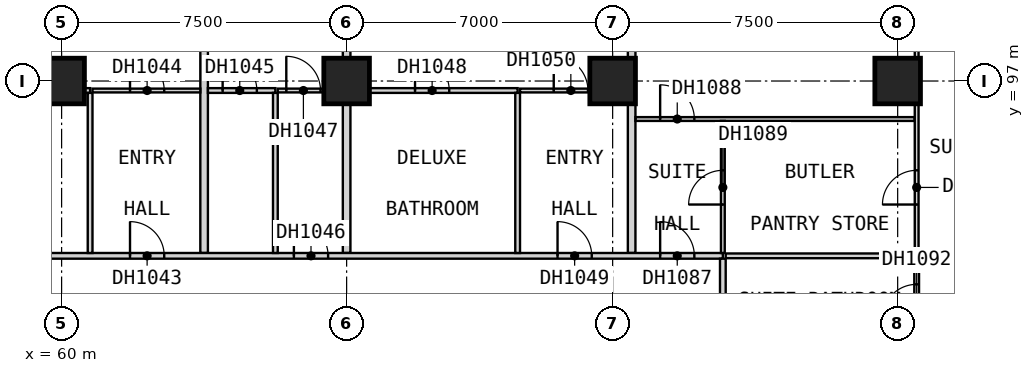
"""IFC4 building model, lengths in metres.
Left out: names, types, materials, properties, quantities, classifications, styles, units other than length and angle.
Written with IfcOpenShell. Run it as: python <this file> out.ifc"""

import sys

from ifc_helpers import new_model, si_unit, direction, frame, frame_2d, origin, origin_2d, place, context, subcontext, project, spatial, rectangle, extrude, element, fill, save


model = new_model("IFC4")
c1 = context("Model", 3, precision=1e-05, world=origin(), true_north=direction((0.0, 1.0)))
c2 = subcontext(c1, "Body", "Model", "MODEL_VIEW")
j1 = project(units=[si_unit("LENGTHUNIT", "METRE"), si_unit("PLANEANGLEUNIT", "RADIAN")], contexts=[c1])
p1 = place(None, origin())
s1 = spatial("IfcSite", under=j1, at=p1, CompositionType="ELEMENT")
p2 = place(p1, origin())
s2 = spatial("IfcBuilding", under=s1, at=p2, CompositionType="ELEMENT")
p3 = place(p2, frame((0.0, 0.0, 34.0)))
s3 = spatial("IfcBuildingStorey", under=s2, at=p3, CompositionType="ELEMENT", Elevation=34.0)
for number, where, z_axis, x_axis in (
    (1, (60.0, 97.0, 0.0), (0.0, 0.0, 1.0), (1.0, 0.0, 0.0)),
    (2, (67.5, 97.0, 0.0), (0.0, 0.0, 1.0), (1.0, 0.0, 0.0)),
    (3, (74.5, 97.0, 0.0), (0.0, 0.0, 1.0), (1.0, 0.0, 0.0)),
    (4, (82.0, 97.0, 0.0), (0.0, 0.0, 1.0), (1.0, 0.0, 0.0)),
):
    element("IfcColumn", number, at=place(p3, frame(where, z_axis=z_axis, x_axis=x_axis)), inside=s3, PredefinedType="COLUMN", context=c2, shape_type="SweptSolid", body=[
        extrude(rectangle(XDim=1.2, YDim=1.2, at=origin_2d()), origin(), (0.0, 0.0, 1.0), 3.6),
    ])
p4 = place(p3, frame((63.75, 92.475, 0.0), z_axis=(0.0, 0.0, 1.0), x_axis=(0.0, 1.0, 0.0)))
e5 = element("IfcWall", 5, at=p4, inside=s3, PredefinedType="PARTITIONING", context=c2, shape_type="SweptSolid", body=[
    extrude(rectangle(XDim=11.715, YDim=0.2, at=frame_2d((5.857, 0.0))), origin(), (0.0, 0.0, 1.0), 3.35),
])
p5 = place(p3, frame((67.5, 92.475, 0.0), z_axis=(0.0, 0.0, 1.0), x_axis=(0.0, 1.0, 0.0)))
e6 = element("IfcWall", 6, at=p5, inside=s3, PredefinedType="PARTITIONING", context=c2, shape_type="SweptSolid", body=[
    extrude(rectangle(XDim=12.525, YDim=0.2, at=frame_2d((6.262, 0.0))), origin(), (0.0, 0.0, 1.0), 3.35),
])
p6 = place(p3, frame((75.0, 92.475, 0.0), z_axis=(0.0, 0.0, 1.0), x_axis=(0.0, 1.0, 0.0)))
e7 = element("IfcWall", 7, at=p6, inside=s3, PredefinedType="PARTITIONING", context=c2, shape_type="SweptSolid", body=[
    extrude(rectangle(XDim=11.715, YDim=0.2, at=frame_2d((5.857, 0.0))), origin(), (0.0, 0.0, 1.0), 3.35),
])
p7 = place(p3, frame((33.75, 92.4, 0.0), z_axis=(0.0, 0.0, 1.0), x_axis=(1.0, 0.0, 0.0)))
e8 = element("IfcWall", 8, at=p7, inside=s3, PredefinedType="PARTITIONING", context=c2, shape_type="SweptSolid", body=[
    extrude(rectangle(XDim=43.65, YDim=0.15, at=frame_2d((21.825, 0.0))), origin(), (0.0, 0.0, 1.0), 3.35),
])
p8 = place(p7, frame((5.175, 0.0, 0.0)))
e9 = element("IfcOpeningElement", 9, at=p8, cuts=e8, PredefinedType="OPENING", context=c2, shape_type="SweptSolid", body=[
    extrude(rectangle(XDim=0.9, YDim=2.1, at=frame_2d((0.45, 1.05))), frame((0.0, 0.085, 0.0), z_axis=(0.0, -1.0, 0.0), x_axis=(1.0, 0.0, 0.0)), (0.0, 0.0, 1.0), 0.17),
])
p9 = place(p7, frame((9.863, 0.0, 0.0)))
e10 = element("IfcOpeningElement", 10, at=p9, cuts=e8, PredefinedType="OPENING", context=c2, shape_type="SweptSolid", body=[
    extrude(rectangle(XDim=0.9, YDim=2.1, at=frame_2d((0.45, 1.05))), frame((0.0, 0.085, 0.0), z_axis=(0.0, -1.0, 0.0), x_axis=(1.0, 0.0, 0.0)), (0.0, 0.0, 1.0), 0.17),
])
p10 = place(p7, frame((13.613, 0.0, 0.0)))
e11 = element("IfcOpeningElement", 11, at=p10, cuts=e8, PredefinedType="OPENING", context=c2, shape_type="SweptSolid", body=[
    extrude(rectangle(XDim=0.9, YDim=2.1, at=frame_2d((0.45, 1.05))), frame((0.0, 0.085, 0.0), z_axis=(0.0, -1.0, 0.0), x_axis=(1.0, 0.0, 0.0)), (0.0, 0.0, 1.0), 0.17),
])
p11 = place(p7, frame((17.363, 0.0, 0.0)))
e12 = element("IfcOpeningElement", 12, at=p11, cuts=e8, PredefinedType="OPENING", context=c2, shape_type="SweptSolid", body=[
    extrude(rectangle(XDim=0.9, YDim=2.1, at=frame_2d((0.45, 1.05))), frame((0.0, 0.085, 0.0), z_axis=(0.0, -1.0, 0.0), x_axis=(1.0, 0.0, 0.0)), (0.0, 0.0, 1.0), 0.17),
])
p12 = place(p7, frame((21.113, 0.0, 0.0)))
e13 = element("IfcOpeningElement", 13, at=p12, cuts=e8, PredefinedType="OPENING", context=c2, shape_type="SweptSolid", body=[
    extrude(rectangle(XDim=0.9, YDim=2.1, at=frame_2d((0.45, 1.05))), frame((0.0, 0.085, 0.0), z_axis=(0.0, -1.0, 0.0), x_axis=(1.0, 0.0, 0.0)), (0.0, 0.0, 1.0), 0.17),
])
p13 = place(p7, frame((28.05, 0.0, 0.0)))
e14 = element("IfcOpeningElement", 14, at=p13, cuts=e8, PredefinedType="OPENING", context=c2, shape_type="SweptSolid", body=[
    extrude(rectangle(XDim=0.9, YDim=2.1, at=frame_2d((0.45, 1.05))), frame((0.0, 0.085, 0.0), z_axis=(0.0, -1.0, 0.0), x_axis=(1.0, 0.0, 0.0)), (0.0, 0.0, 1.0), 0.17),
])
p14 = place(p7, frame((32.363, 0.0, 0.0)))
e15 = element("IfcOpeningElement", 15, at=p14, cuts=e8, PredefinedType="OPENING", context=c2, shape_type="SweptSolid", body=[
    extrude(rectangle(XDim=0.9, YDim=2.1, at=frame_2d((0.45, 1.05))), frame((0.0, 0.085, 0.0), z_axis=(0.0, -1.0, 0.0), x_axis=(1.0, 0.0, 0.0)), (0.0, 0.0, 1.0), 0.17),
])
p15 = place(p7, frame((39.3, 0.0, 0.0)))
e16 = element("IfcOpeningElement", 16, at=p15, cuts=e8, PredefinedType="OPENING", context=c2, shape_type="SweptSolid", body=[
    extrude(rectangle(XDim=0.9, YDim=2.1, at=frame_2d((0.45, 1.05))), frame((0.0, 0.085, 0.0), z_axis=(0.0, -1.0, 0.0), x_axis=(1.0, 0.0, 0.0)), (0.0, 0.0, 1.0), 0.17),
])
p16 = place(p7, frame((42.0, 0.0, 0.0)))
e17 = element("IfcOpeningElement", 17, at=p16, cuts=e8, PredefinedType="OPENING", context=c2, shape_type="SweptSolid", body=[
    extrude(rectangle(XDim=0.9, YDim=2.1, at=frame_2d((0.45, 1.05))), frame((0.0, 0.085, 0.0), z_axis=(0.0, -1.0, 0.0), x_axis=(1.0, 0.0, 0.0)), (0.0, 0.0, 1.0), 0.17),
])
p17 = place(p3, frame((77.4, 50.175, 0.0), z_axis=(0.0, 0.0, 1.0), x_axis=(0.0, 1.0, 0.0)))
e18 = element("IfcWall", 18, at=p17, inside=s3, PredefinedType="PARTITIONING", context=c2, shape_type="SweptSolid", body=[
    extrude(rectangle(XDim=42.15, YDim=0.15, at=frame_2d((21.075, 0.0))), origin(), (0.0, 0.0, 1.0), 3.35),
])
p18 = place(p17, frame((4.688, 0.0, 0.0)))
e19 = element("IfcOpeningElement", 19, at=p18, cuts=e18, PredefinedType="OPENING", context=c2, shape_type="SweptSolid", body=[
    extrude(rectangle(XDim=0.9, YDim=2.1, at=frame_2d((0.45, 1.05))), frame((0.0, 0.085, 0.0), z_axis=(0.0, -1.0, 0.0), x_axis=(1.0, 0.0, 0.0)), (0.0, 0.0, 1.0), 0.17),
])
p19 = place(p17, frame((8.438, 0.0, 0.0)))
e20 = element("IfcOpeningElement", 20, at=p19, cuts=e18, PredefinedType="OPENING", context=c2, shape_type="SweptSolid", body=[
    extrude(rectangle(XDim=0.9, YDim=2.1, at=frame_2d((0.45, 1.05))), frame((0.0, 0.085, 0.0), z_axis=(0.0, -1.0, 0.0), x_axis=(1.0, 0.0, 0.0)), (0.0, 0.0, 1.0), 0.17),
])
p20 = place(p17, frame((12.188, 0.0, 0.0)))
e21 = element("IfcOpeningElement", 21, at=p20, cuts=e18, PredefinedType="OPENING", context=c2, shape_type="SweptSolid", body=[
    extrude(rectangle(XDim=0.9, YDim=2.1, at=frame_2d((0.45, 1.05))), frame((0.0, 0.085, 0.0), z_axis=(0.0, -1.0, 0.0), x_axis=(1.0, 0.0, 0.0)), (0.0, 0.0, 1.0), 0.17),
])
p21 = place(p17, frame((15.938, 0.0, 0.0)))
e22 = element("IfcOpeningElement", 22, at=p21, cuts=e18, PredefinedType="OPENING", context=c2, shape_type="SweptSolid", body=[
    extrude(rectangle(XDim=0.9, YDim=2.1, at=frame_2d((0.45, 1.05))), frame((0.0, 0.085, 0.0), z_axis=(0.0, -1.0, 0.0), x_axis=(1.0, 0.0, 0.0)), (0.0, 0.0, 1.0), 0.17),
])
p22 = place(p17, frame((19.688, 0.0, 0.0)))
e23 = element("IfcOpeningElement", 23, at=p22, cuts=e18, PredefinedType="OPENING", context=c2, shape_type="SweptSolid", body=[
    extrude(rectangle(XDim=0.9, YDim=2.1, at=frame_2d((0.45, 1.05))), frame((0.0, 0.085, 0.0), z_axis=(0.0, -1.0, 0.0), x_axis=(1.0, 0.0, 0.0)), (0.0, 0.0, 1.0), 0.17),
])
p23 = place(p17, frame((23.438, 0.0, 0.0)))
e24 = element("IfcOpeningElement", 24, at=p23, cuts=e18, PredefinedType="OPENING", context=c2, shape_type="SweptSolid", body=[
    extrude(rectangle(XDim=0.9, YDim=2.1, at=frame_2d((0.45, 1.05))), frame((0.0, 0.085, 0.0), z_axis=(0.0, -1.0, 0.0), x_axis=(1.0, 0.0, 0.0)), (0.0, 0.0, 1.0), 0.17),
])
p24 = place(p17, frame((27.188, 0.0, 0.0)))
e25 = element("IfcOpeningElement", 25, at=p24, cuts=e18, PredefinedType="OPENING", context=c2, shape_type="SweptSolid", body=[
    extrude(rectangle(XDim=0.9, YDim=2.1, at=frame_2d((0.45, 1.05))), frame((0.0, 0.085, 0.0), z_axis=(0.0, -1.0, 0.0), x_axis=(1.0, 0.0, 0.0)), (0.0, 0.0, 1.0), 0.17),
])
p25 = place(p17, frame((30.938, 0.0, 0.0)))
e26 = element("IfcOpeningElement", 26, at=p25, cuts=e18, PredefinedType="OPENING", context=c2, shape_type="SweptSolid", body=[
    extrude(rectangle(XDim=0.9, YDim=2.1, at=frame_2d((0.45, 1.05))), frame((0.0, 0.085, 0.0), z_axis=(0.0, -1.0, 0.0), x_axis=(1.0, 0.0, 0.0)), (0.0, 0.0, 1.0), 0.17),
])
p26 = place(p17, frame((34.688, 0.0, 0.0)))
e27 = element("IfcOpeningElement", 27, at=p26, cuts=e18, PredefinedType="OPENING", context=c2, shape_type="SweptSolid", body=[
    extrude(rectangle(XDim=0.9, YDim=2.1, at=frame_2d((0.45, 1.05))), frame((0.0, 0.085, 0.0), z_axis=(0.0, -1.0, 0.0), x_axis=(1.0, 0.0, 0.0)), (0.0, 0.0, 1.0), 0.17),
])
p27 = place(p17, frame((38.438, 0.0, 0.0)))
e28 = element("IfcOpeningElement", 28, at=p27, cuts=e18, PredefinedType="OPENING", context=c2, shape_type="SweptSolid", body=[
    extrude(rectangle(XDim=0.9, YDim=2.1, at=frame_2d((0.45, 1.05))), frame((0.0, 0.085, 0.0), z_axis=(0.0, -1.0, 0.0), x_axis=(1.0, 0.0, 0.0)), (0.0, 0.0, 1.0), 0.17),
])
p28 = place(p3, frame((75.1, 96.0, 0.0), z_axis=(0.0, 0.0, 1.0), x_axis=(1.0, 0.0, 0.0)))
e29 = element("IfcWall", 29, at=p28, inside=s3, PredefinedType="PARTITIONING", context=c2, shape_type="SweptSolid", body=[
    extrude(rectangle(XDim=7.35, YDim=0.1, at=frame_2d((3.675, 0.0))), origin(), (0.0, 0.0, 1.0), 3.35),
])
p29 = place(p28, frame((0.65, 0.0, 0.0)))
e30 = element("IfcOpeningElement", 30, at=p29, cuts=e29, PredefinedType="OPENING", context=c2, shape_type="SweptSolid", body=[
    extrude(rectangle(XDim=0.9, YDim=2.1, at=frame_2d((0.45, 1.05))), frame((0.0, 0.06, 0.0), z_axis=(0.0, -1.0, 0.0), x_axis=(1.0, 0.0, 0.0)), (0.0, 0.0, 1.0), 0.12),
])
p30 = place(p3, frame((60.812, 96.75, 0.0), z_axis=(0.0, 0.0, 1.0), x_axis=(1.0, 0.0, 0.0)))
e31 = element("IfcWall", 31, at=p30, inside=s3, PredefinedType="PARTITIONING", context=c2, shape_type="SweptSolid", body=[
    extrude(rectangle(XDim=2.837, YDim=0.1, at=frame_2d((1.419, 0.0))), origin(), (0.0, 0.0, 1.0), 3.35),
])
p31 = place(p30, frame((0.988, 0.0, 0.0)))
e32 = element("IfcOpeningElement", 32, at=p31, cuts=e31, PredefinedType="OPENING", context=c2, shape_type="SweptSolid", body=[
    extrude(rectangle(XDim=0.9, YDim=2.1, at=frame_2d((0.45, 1.05))), frame((0.0, 0.06, 0.0), z_axis=(0.0, -1.0, 0.0), x_axis=(1.0, 0.0, 0.0)), (0.0, 0.0, 1.0), 0.12),
])
p32 = place(p3, frame((65.688, 96.75, 0.0), z_axis=(0.0, 0.0, 1.0), x_axis=(1.0, 0.0, 0.0)))
e33 = element("IfcWall", 33, at=p32, inside=s3, PredefinedType="PARTITIONING", context=c2, shape_type="SweptSolid", body=[
    extrude(rectangle(XDim=1.712, YDim=0.1, at=frame_2d((0.856, 0.0))), origin(), (0.0, 0.0, 1.0), 3.35),
])
p33 = place(p32, frame((0.225, 0.0, 0.0)))
e34 = element("IfcOpeningElement", 34, at=p33, cuts=e33, PredefinedType="OPENING", context=c2, shape_type="SweptSolid", body=[
    extrude(rectangle(XDim=0.9, YDim=2.1, at=frame_2d((0.45, 1.05))), frame((0.0, 0.06, 0.0), z_axis=(0.0, -1.0, 0.0), x_axis=(1.0, 0.0, 0.0)), (0.0, 0.0, 1.0), 0.12),
])
p34 = place(p3, frame((72.062, 96.75, 0.0), z_axis=(0.0, 0.0, 1.0), x_axis=(1.0, 0.0, 0.0)))
e35 = element("IfcWall", 35, at=p34, inside=s3, PredefinedType="PARTITIONING", context=c2, shape_type="SweptSolid", body=[
    extrude(rectangle(XDim=2.837, YDim=0.1, at=frame_2d((1.419, 0.0))), origin(), (0.0, 0.0, 1.0), 3.35),
])
p35 = place(p34, frame((0.887, 0.0, 0.0)))
e36 = element("IfcOpeningElement", 36, at=p35, cuts=e35, PredefinedType="OPENING", context=c2, shape_type="SweptSolid", body=[
    extrude(rectangle(XDim=0.9, YDim=2.1, at=frame_2d((0.45, 1.05))), frame((0.0, 0.06, 0.0), z_axis=(0.0, -1.0, 0.0), x_axis=(1.0, 0.0, 0.0)), (0.0, 0.0, 1.0), 0.12),
])
p36 = place(p3, frame((77.4, 92.475, 0.0), z_axis=(0.0, 0.0, 1.0), x_axis=(0.0, 1.0, 0.0)))
e37 = element("IfcWall", 37, at=p36, inside=s3, PredefinedType="PARTITIONING", context=c2, shape_type="SweptSolid", body=[
    extrude(rectangle(XDim=3.475, YDim=0.1, at=frame_2d((1.737, 0.0))), origin(), (0.0, 0.0, 1.0), 3.35),
])
p37 = place(p36, frame((1.275, 0.0, 0.0)))
e38 = element("IfcOpeningElement", 38, at=p37, cuts=e37, PredefinedType="OPENING", context=c2, shape_type="SweptSolid", body=[
    extrude(rectangle(XDim=0.9, YDim=2.1, at=frame_2d((0.45, 1.05))), frame((0.0, 0.06, 0.0), z_axis=(0.0, -1.0, 0.0), x_axis=(1.0, 0.0, 0.0)), (0.0, 0.0, 1.0), 0.12),
])
p38 = place(p3, frame((82.5, 92.462, 0.0), z_axis=(0.0, 0.0, 1.0), x_axis=(0.0, 1.0, 0.0)))
e39 = element("IfcWall", 39, at=p38, inside=s3, PredefinedType="PARTITIONING", context=c2, shape_type="SweptSolid", body=[
    extrude(rectangle(XDim=11.728, YDim=0.1, at=frame_2d((5.864, 0.0))), origin(), (0.0, 0.0, 1.0), 3.35),
])
p39 = place(p38, frame((9.837, 0.0, 0.0)))
e40 = element("IfcOpeningElement", 40, at=p39, cuts=e39, PredefinedType="OPENING", context=c2, shape_type="SweptSolid", body=[
    extrude(rectangle(XDim=0.9, YDim=2.1, at=frame_2d((0.45, 1.05))), frame((0.0, 0.06, 0.0), z_axis=(0.0, -1.0, 0.0), x_axis=(1.0, 0.0, 0.0)), (0.0, 0.0, 1.0), 0.12),
])
p40 = place(p38, frame((1.288, 0.0, 0.0)))
e41 = element("IfcOpeningElement", 41, at=p40, cuts=e39, PredefinedType="OPENING", context=c2, shape_type="SweptSolid", body=[
    extrude(rectangle(XDim=0.9, YDim=2.1, at=frame_2d((0.45, 1.05))), frame((0.0, 0.06, 0.0), z_axis=(0.0, -1.0, 0.0), x_axis=(1.0, 0.0, 0.0)), (0.0, 0.0, 1.0), 0.12),
])
p41 = place(p3, frame((77.475, 92.4, 0.0), z_axis=(0.0, 0.0, 1.0), x_axis=(1.0, 0.0, 0.0)))
e42 = element("IfcWall", 42, at=p41, inside=s3, PredefinedType="PARTITIONING", context=c2, shape_type="SweptSolid", body=[
    extrude(rectangle(XDim=5.025, YDim=0.125, at=frame_2d((2.512, 0.0))), origin(), (0.0, 0.0, 1.0), 3.35),
])
p42 = place(p3, frame((56.35, 96.75, 0.0), z_axis=(0.0, 0.0, 1.0), x_axis=(1.0, 0.0, 0.0)))
e43 = element("IfcWall", 43, at=p42, inside=s3, PredefinedType="PARTITIONING", context=c2, shape_type="SweptSolid", body=[
    extrude(rectangle(XDim=4.4, YDim=0.125, at=frame_2d((2.2, 0.0))), origin(), (0.0, 0.0, 1.0), 3.35),
])
p43 = place(p42, frame((1.7, 0.0, 0.0)))
e44 = element("IfcOpeningElement", 44, at=p43, cuts=e43, PredefinedType="OPENING", context=c2, shape_type="SweptSolid", body=[
    extrude(rectangle(XDim=0.9, YDim=2.1, at=frame_2d((0.45, 1.05))), frame((0.0, 0.073, 0.0), z_axis=(0.0, -1.0, 0.0), x_axis=(1.0, 0.0, 0.0)), (0.0, 0.0, 1.0), 0.145),
])
p44 = place(p3, frame((63.85, 96.75, 0.0), z_axis=(0.0, 0.0, 1.0), x_axis=(1.0, 0.0, 0.0)))
e45 = element("IfcWall", 45, at=p44, inside=s3, PredefinedType="PARTITIONING", context=c2, shape_type="SweptSolid", body=[
    extrude(rectangle(XDim=1.775, YDim=0.125, at=frame_2d((0.887, 0.0))), origin(), (0.0, 0.0, 1.0), 3.35),
])
p45 = place(p44, frame((0.387, 0.0, 0.0)))
e46 = element("IfcOpeningElement", 46, at=p45, cuts=e45, PredefinedType="OPENING", context=c2, shape_type="SweptSolid", body=[
    extrude(rectangle(XDim=0.9, YDim=2.1, at=frame_2d((0.45, 1.05))), frame((0.0, 0.073, 0.0), z_axis=(0.0, -1.0, 0.0), x_axis=(1.0, 0.0, 0.0)), (0.0, 0.0, 1.0), 0.145),
])
p46 = place(p3, frame((67.6, 96.75, 0.0), z_axis=(0.0, 0.0, 1.0), x_axis=(1.0, 0.0, 0.0)))
e47 = element("IfcWall", 47, at=p46, inside=s3, PredefinedType="PARTITIONING", context=c2, shape_type="SweptSolid", body=[
    extrude(rectangle(XDim=4.4, YDim=0.125, at=frame_2d((2.2, 0.0))), origin(), (0.0, 0.0, 1.0), 3.35),
])
p47 = place(p46, frame((1.7, 0.0, 0.0)))
e48 = element("IfcOpeningElement", 48, at=p47, cuts=e47, PredefinedType="OPENING", context=c2, shape_type="SweptSolid", body=[
    extrude(rectangle(XDim=0.9, YDim=2.1, at=frame_2d((0.45, 1.05))), frame((0.0, 0.073, 0.0), z_axis=(0.0, -1.0, 0.0), x_axis=(1.0, 0.0, 0.0)), (0.0, 0.0, 1.0), 0.145),
])
for number, where, z_axis, x_axis in (
    (49, (60.75, 92.475, 0.0), (0.0, 0.0, 1.0), (0.0, 1.0, 0.0)),
    (50, (65.625, 92.475, 0.0), (0.0, 0.0, 1.0), (0.0, 1.0, 0.0)),
    (51, (72.0, 92.475, 0.0), (0.0, 0.0, 1.0), (0.0, 1.0, 0.0)),
):
    element("IfcWall", number, at=place(p3, frame(where, z_axis=z_axis, x_axis=x_axis)), inside=s3, PredefinedType="PARTITIONING", context=c2, shape_type="SweptSolid", body=[
        extrude(rectangle(XDim=4.212, YDim=0.125, at=frame_2d((2.106, 0.0))), origin(), (0.0, 0.0, 1.0), 3.35),
    ])
p48 = place(p3, frame((82.5, 90.1, 0.0), z_axis=(0.0, 0.0, 1.0), x_axis=(0.0, 1.0, 0.0)))
e52 = element("IfcWall", 52, at=p48, inside=s3, PredefinedType="PARTITIONING", context=c2, shape_type="SweptSolid", body=[
    extrude(rectangle(XDim=2.237, YDim=0.125, at=frame_2d((1.119, 0.0))), origin(), (0.0, 0.0, 1.0), 3.35),
])
p49 = place(p48, frame((0.65, 0.0, 0.0)))
e53 = element("IfcOpeningElement", 53, at=p49, cuts=e52, PredefinedType="OPENING", context=c2, shape_type="SweptSolid", body=[
    extrude(rectangle(XDim=0.9, YDim=2.1, at=frame_2d((0.45, 1.05))), frame((0.0, 0.073, 0.0), z_axis=(0.0, -1.0, 0.0), x_axis=(1.0, 0.0, 0.0)), (0.0, 0.0, 1.0), 0.145),
])
p50 = place(p13, origin())
e54 = element("IfcDoor", 54, at=p50, inside=s3, OperationType="SINGLE_SWING_LEFT", PredefinedType="DOOR", context=c2, shape_type="SweptSolid", body=[
    extrude(rectangle(XDim=0.9, YDim=2.1, at=frame_2d((0.45, 1.05))), frame((0.0, 0.025, 0.0), z_axis=(0.0, -1.0, 0.0), x_axis=(1.0, 0.0, 0.0)), (0.0, 0.0, 1.0), 0.05),
])
fill(e14, e54)
p51 = place(p31, origin())
e55 = element("IfcDoor", 55, at=p51, inside=s3, OperationType="SINGLE_SWING_RIGHT", PredefinedType="DOOR", context=c2, shape_type="SweptSolid", body=[
    extrude(rectangle(XDim=0.9, YDim=2.1, at=frame_2d((0.45, 1.05))), frame((0.0, 0.025, 0.0), z_axis=(0.0, -1.0, 0.0), x_axis=(1.0, 0.0, 0.0)), (0.0, 0.0, 1.0), 0.05),
])
fill(e32, e55)
p52 = place(p45, origin())
e56 = element("IfcDoor", 56, at=p52, inside=s3, OperationType="SINGLE_SWING_RIGHT", PredefinedType="DOOR", context=c2, shape_type="SweptSolid", body=[
    extrude(rectangle(XDim=0.9, YDim=2.1, at=frame_2d((0.45, 1.05))), frame((0.0, 0.025, 0.0), z_axis=(0.0, -1.0, 0.0), x_axis=(1.0, 0.0, 0.0)), (0.0, 0.0, 1.0), 0.05),
])
fill(e46, e56)
p53 = place(p14, origin())
e57 = element("IfcDoor", 57, at=p53, inside=s3, OperationType="SINGLE_SWING_LEFT", PredefinedType="DOOR", context=c2, shape_type="SweptSolid", body=[
    extrude(rectangle(XDim=0.9, YDim=2.1, at=frame_2d((0.45, 1.05))), frame((0.0, 0.025, 0.0), z_axis=(0.0, -1.0, 0.0), x_axis=(1.0, 0.0, 0.0)), (0.0, 0.0, 1.0), 0.05),
])
fill(e15, e57)
p54 = place(p33, origin())
e58 = element("IfcDoor", 58, at=p54, inside=s3, OperationType="SINGLE_SWING_RIGHT", PredefinedType="DOOR", context=c2, shape_type="SweptSolid", body=[
    extrude(rectangle(XDim=0.9, YDim=2.1, at=frame_2d((0.45, 1.05))), frame((0.0, 0.025, 0.0), z_axis=(0.0, -1.0, 0.0), x_axis=(1.0, 0.0, 0.0)), (0.0, 0.0, 1.0), 0.05),
])
fill(e34, e58)
p55 = place(p47, origin())
e59 = element("IfcDoor", 59, at=p55, inside=s3, OperationType="SINGLE_SWING_RIGHT", PredefinedType="DOOR", context=c2, shape_type="SweptSolid", body=[
    extrude(rectangle(XDim=0.9, YDim=2.1, at=frame_2d((0.45, 1.05))), frame((0.0, 0.025, 0.0), z_axis=(0.0, -1.0, 0.0), x_axis=(1.0, 0.0, 0.0)), (0.0, 0.0, 1.0), 0.05),
])
fill(e48, e59)
p56 = place(p15, origin())
e60 = element("IfcDoor", 60, at=p56, inside=s3, OperationType="SINGLE_SWING_LEFT", PredefinedType="DOOR", context=c2, shape_type="SweptSolid", body=[
    extrude(rectangle(XDim=0.9, YDim=2.1, at=frame_2d((0.45, 1.05))), frame((0.0, 0.025, 0.0), z_axis=(0.0, -1.0, 0.0), x_axis=(1.0, 0.0, 0.0)), (0.0, 0.0, 1.0), 0.05),
])
fill(e16, e60)
p57 = place(p35, origin())
e61 = element("IfcDoor", 61, at=p57, inside=s3, OperationType="SINGLE_SWING_RIGHT", PredefinedType="DOOR", context=c2, shape_type="SweptSolid", body=[
    extrude(rectangle(XDim=0.9, YDim=2.1, at=frame_2d((0.45, 1.05))), frame((0.0, 0.025, 0.0), z_axis=(0.0, -1.0, 0.0), x_axis=(1.0, 0.0, 0.0)), (0.0, 0.0, 1.0), 0.05),
])
fill(e36, e61)
p58 = place(p16, origin())
e62 = element("IfcDoor", 62, at=p58, inside=s3, OperationType="SINGLE_SWING_RIGHT", PredefinedType="DOOR", context=c2, shape_type="SweptSolid", body=[
    extrude(rectangle(XDim=0.9, YDim=2.1, at=frame_2d((0.45, 1.05))), frame((0.0, 0.025, 0.0), z_axis=(0.0, -1.0, 0.0), x_axis=(1.0, 0.0, 0.0)), (0.0, 0.0, 1.0), 0.05),
])
fill(e17, e62)
p59 = place(p29, origin())
e63 = element("IfcDoor", 63, at=p59, inside=s3, OperationType="SINGLE_SWING_LEFT", PredefinedType="DOOR", context=c2, shape_type="SweptSolid", body=[
    extrude(rectangle(XDim=0.9, YDim=2.1, at=frame_2d((0.45, 1.05))), frame((0.0, 0.025, 0.0), z_axis=(0.0, -1.0, 0.0), x_axis=(1.0, 0.0, 0.0)), (0.0, 0.0, 1.0), 0.05),
])
fill(e30, e63)
p60 = place(p37, origin())
e64 = element("IfcDoor", 64, at=p60, inside=s3, OperationType="SINGLE_SWING_RIGHT", PredefinedType="DOOR", context=c2, shape_type="SweptSolid", body=[
    extrude(rectangle(XDim=0.9, YDim=2.1, at=frame_2d((0.45, 1.05))), frame((0.0, 0.025, 0.0), z_axis=(0.0, -1.0, 0.0), x_axis=(1.0, 0.0, 0.0)), (0.0, 0.0, 1.0), 0.05),
])
fill(e38, e64)
p61 = place(p40, origin())
e65 = element("IfcDoor", 65, at=p61, inside=s3, OperationType="SINGLE_SWING_RIGHT", PredefinedType="DOOR", context=c2, shape_type="SweptSolid", body=[
    extrude(rectangle(XDim=0.9, YDim=2.1, at=frame_2d((0.45, 1.05))), frame((0.0, 0.025, 0.0), z_axis=(0.0, -1.0, 0.0), x_axis=(1.0, 0.0, 0.0)), (0.0, 0.0, 1.0), 0.05),
])
fill(e41, e65)
p62 = place(p49, origin())
e66 = element("IfcDoor", 66, at=p62, inside=s3, OperationType="SINGLE_SWING_LEFT", PredefinedType="DOOR", context=c2, shape_type="SweptSolid", body=[
    extrude(rectangle(XDim=0.9, YDim=2.1, at=frame_2d((0.45, 1.05))), frame((0.0, 0.025, 0.0), z_axis=(0.0, -1.0, 0.0), x_axis=(1.0, 0.0, 0.0)), (0.0, 0.0, 1.0), 0.05),
])
fill(e53, e66)
save(model, sys.argv[1])
